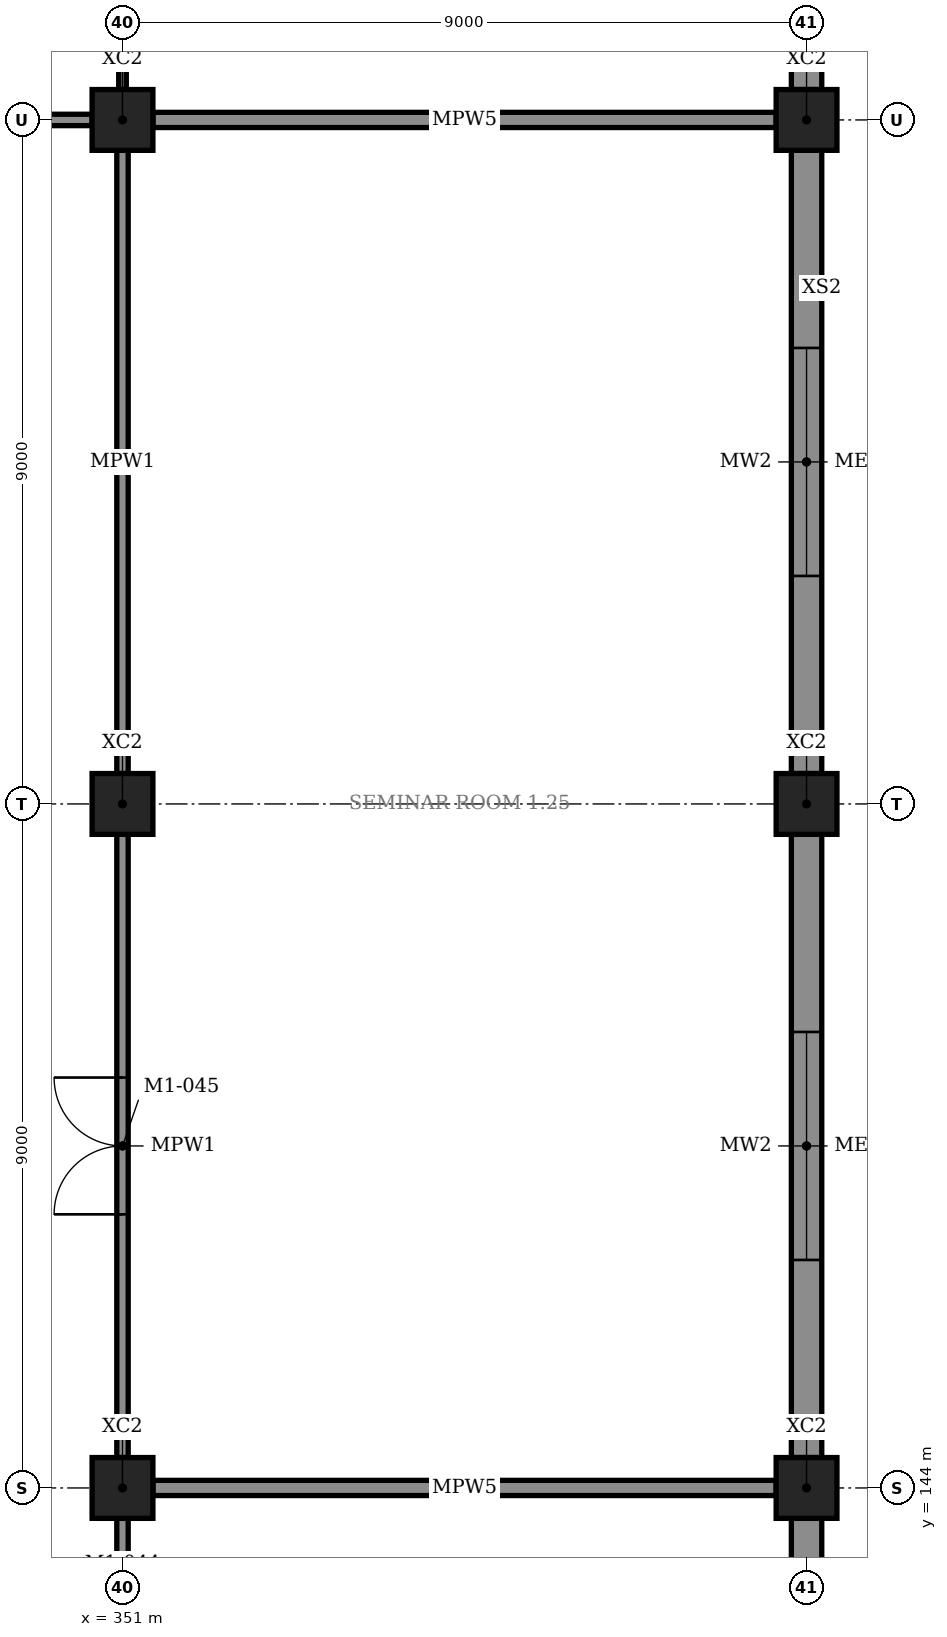
"""IFC4 building model, lengths in metres.
Left out: names, types, materials, properties, quantities, classifications, styles, units other than length and angle.
Written with IfcOpenShell. Run it as: python <this file> out.ifc"""

import sys

from ifc_helpers import new_model, si_unit, direction, frame, frame_2d, origin, origin_2d, place, context, subcontext, project, spatial, rectangle, extrude, element, fill, save


model = new_model("IFC4")
c1 = context("Model", 3, precision=1e-05, world=origin(), true_north=direction((0.0, 1.0)))
c2 = subcontext(c1, "Body", "Model", "MODEL_VIEW")
j1 = project(units=[si_unit("LENGTHUNIT", "METRE"), si_unit("PLANEANGLEUNIT", "RADIAN")], contexts=[c1])
p1 = place(None, origin())
s1 = spatial("IfcSite", under=j1, at=p1, CompositionType="ELEMENT")
p2 = place(p1, origin())
s2 = spatial("IfcBuilding", under=s1, at=p2, CompositionType="ELEMENT")
p3 = place(p2, frame((0.0, 0.0, 6.0)))
s3 = spatial("IfcBuildingStorey", under=s2, at=p3, CompositionType="ELEMENT", Elevation=6.0)
for number, where, z_axis, x_axis in (
    (1, (351.0, 144.0, 0.0), (0.0, 0.0, 1.0), (1.0, 0.0, 0.0)),
    (2, (351.0, 153.0, 0.0), (0.0, 0.0, 1.0), (1.0, 0.0, 0.0)),
    (3, (351.0, 162.0, 0.0), (0.0, 0.0, 1.0), (1.0, 0.0, 0.0)),
    (4, (360.0, 144.0, 0.0), (0.0, 0.0, 1.0), (1.0, 0.0, 0.0)),
    (5, (360.0, 153.0, 0.0), (0.0, 0.0, 1.0), (1.0, 0.0, 0.0)),
    (6, (360.0, 162.0, 0.0), (0.0, 0.0, 1.0), (1.0, 0.0, 0.0)),
):
    element("IfcColumn", number, at=place(p3, frame(where, z_axis=z_axis, x_axis=x_axis)), inside=s3, PredefinedType="COLUMN", context=c2, shape_type="SweptSolid", body=[
        extrude(rectangle(XDim=0.8, YDim=0.8, at=origin_2d()), origin(), (0.0, 0.0, 1.0), 5.5),
    ])
p4 = place(p3, frame((360.0, 135.4, 0.0), z_axis=(0.0, 0.0, 1.0), x_axis=(0.0, 1.0, 0.0)))
e7 = element("IfcWall", 7, at=p4, inside=s3, PredefinedType="STANDARD", context=c2, shape_type="SweptSolid", body=[
    extrude(rectangle(XDim=8.2, YDim=0.4, at=frame_2d((4.1, 0.0))), origin(), (0.0, 0.0, 1.0), 4.32),
])
p5 = place(p4, frame((2.6, 0.0, 0.9)))
e8 = element("IfcOpeningElement", 8, at=p5, cuts=e7, PredefinedType="OPENING", context=c2, shape_type="SweptSolid", body=[
    extrude(rectangle(XDim=3.0, YDim=2.1, at=frame_2d((1.5, 1.05))), frame((0.0, 0.21, 0.0), z_axis=(0.0, -1.0, 0.0), x_axis=(1.0, 0.0, 0.0)), (0.0, 0.0, 1.0), 0.42),
])
p6 = place(p3, frame((360.0, 144.4, 0.0), z_axis=(0.0, 0.0, 1.0), x_axis=(0.0, 1.0, 0.0)))
e9 = element("IfcWall", 9, at=p6, inside=s3, PredefinedType="STANDARD", context=c2, shape_type="SweptSolid", body=[
    extrude(rectangle(XDim=8.2, YDim=0.4, at=frame_2d((4.1, 0.0))), origin(), (0.0, 0.0, 1.0), 4.32),
])
p7 = place(p6, frame((2.6, 0.0, 0.9)))
e10 = element("IfcOpeningElement", 10, at=p7, cuts=e9, PredefinedType="OPENING", context=c2, shape_type="SweptSolid", body=[
    extrude(rectangle(XDim=3.0, YDim=2.1, at=frame_2d((1.5, 1.05))), frame((0.0, 0.21, 0.0), z_axis=(0.0, -1.0, 0.0), x_axis=(1.0, 0.0, 0.0)), (0.0, 0.0, 1.0), 0.42),
])
p8 = place(p3, frame((360.0, 153.4, 0.0), z_axis=(0.0, 0.0, 1.0), x_axis=(0.0, 1.0, 0.0)))
e11 = element("IfcWall", 11, at=p8, inside=s3, PredefinedType="STANDARD", context=c2, shape_type="SweptSolid", body=[
    extrude(rectangle(XDim=8.2, YDim=0.4, at=frame_2d((4.1, 0.0))), origin(), (0.0, 0.0, 1.0), 4.32),
])
p9 = place(p8, frame((2.6, 0.0, 0.9)))
e12 = element("IfcOpeningElement", 12, at=p9, cuts=e11, PredefinedType="OPENING", context=c2, shape_type="SweptSolid", body=[
    extrude(rectangle(XDim=3.0, YDim=2.1, at=frame_2d((1.5, 1.05))), frame((0.0, 0.21, 0.0), z_axis=(0.0, -1.0, 0.0), x_axis=(1.0, 0.0, 0.0)), (0.0, 0.0, 1.0), 0.42),
])
p10 = place(p3, frame((360.0, 162.4, 0.0), z_axis=(0.0, 0.0, 1.0), x_axis=(0.0, 1.0, 0.0)))
e13 = element("IfcWall", 13, at=p10, inside=s3, PredefinedType="STANDARD", context=c2, shape_type="SweptSolid", body=[
    extrude(rectangle(XDim=8.2, YDim=0.4, at=frame_2d((4.1, 0.0))), origin(), (0.0, 0.0, 1.0), 4.32),
])
p11 = place(p10, frame((1.638, 0.0, 0.9)))
e14 = element("IfcOpeningElement", 14, at=p11, cuts=e13, PredefinedType="OPENING", context=c2, shape_type="SweptSolid", body=[
    extrude(rectangle(XDim=3.0, YDim=2.1, at=frame_2d((1.5, 1.05))), frame((0.0, 0.21, 0.0), z_axis=(0.0, -1.0, 0.0), x_axis=(1.0, 0.0, 0.0)), (0.0, 0.0, 1.0), 0.42),
])
p12 = place(p3, frame((342.4, 162.0, 0.0), z_axis=(0.0, 0.0, 1.0), x_axis=(1.0, 0.0, 0.0)))
e15 = element("IfcWall", 15, at=p12, inside=s3, PredefinedType="PARTITIONING", context=c2, shape_type="SweptSolid", body=[
    extrude(rectangle(XDim=8.2, YDim=0.15, at=frame_2d((4.1, 0.0))), origin(), (0.0, 0.0, 1.0), 4.32),
])
p13 = place(p12, frame((3.6, 0.0, 0.0)))
e16 = element("IfcOpeningElement", 16, at=p13, cuts=e15, PredefinedType="OPENING", context=c2, shape_type="SweptSolid", body=[
    extrude(rectangle(XDim=1.0, YDim=2.4, at=frame_2d((0.5, 1.2))), frame((0.0, 0.085, 0.0), z_axis=(0.0, -1.0, 0.0), x_axis=(1.0, 0.0, 0.0)), (0.0, 0.0, 1.0), 0.17),
])
p14 = place(p3, frame((351.0, 162.4, 0.0), z_axis=(0.0, 0.0, 1.0), x_axis=(0.0, 1.0, 0.0)))
e17 = element("IfcWall", 17, at=p14, inside=s3, PredefinedType="PARTITIONING", context=c2, shape_type="SweptSolid", body=[
    extrude(rectangle(XDim=6.275, YDim=0.1, at=frame_2d((3.138, 0.0))), origin(), (0.0, 0.0, 1.0), 4.32),
])
p15 = place(p3, frame((351.4, 144.0, 0.0), z_axis=(0.0, 0.0, 1.0), x_axis=(1.0, 0.0, 0.0)))
e18 = element("IfcWall", 18, at=p15, inside=s3, PredefinedType="PARTITIONING", context=c2, shape_type="SweptSolid", body=[
    extrude(rectangle(XDim=8.2, YDim=0.2, at=frame_2d((4.1, 0.0))), origin(), (0.0, 0.0, 1.0), 4.32),
])
p16 = place(p3, frame((351.0, 135.4, 0.0), z_axis=(0.0, 0.0, 1.0), x_axis=(0.0, 1.0, 0.0)))
e19 = element("IfcWall", 19, at=p16, inside=s3, PredefinedType="PARTITIONING", context=c2, shape_type="SweptSolid", body=[
    extrude(rectangle(XDim=8.2, YDim=0.15, at=frame_2d((4.1, 0.0))), origin(), (0.0, 0.0, 1.0), 4.32),
])
p17 = place(p16, frame((6.3, 0.0, 0.0)))
e20 = element("IfcOpeningElement", 20, at=p17, cuts=e19, PredefinedType="OPENING", context=c2, shape_type="SweptSolid", body=[
    extrude(rectangle(XDim=1.0, YDim=2.4, at=frame_2d((0.5, 1.2))), frame((0.0, 0.085, 0.0), z_axis=(0.0, -1.0, 0.0), x_axis=(1.0, 0.0, 0.0)), (0.0, 0.0, 1.0), 0.17),
])
p18 = place(p3, frame((351.4, 162.0, 0.0), z_axis=(0.0, 0.0, 1.0), x_axis=(1.0, 0.0, 0.0)))
e21 = element("IfcWall", 21, at=p18, inside=s3, PredefinedType="PARTITIONING", context=c2, shape_type="SweptSolid", body=[
    extrude(rectangle(XDim=8.2, YDim=0.2, at=frame_2d((4.1, 0.0))), origin(), (0.0, 0.0, 1.0), 4.32),
])
p19 = place(p3, frame((351.0, 144.4, 0.0), z_axis=(0.0, 0.0, 1.0), x_axis=(0.0, 1.0, 0.0)))
e22 = element("IfcWall", 22, at=p19, inside=s3, PredefinedType="PARTITIONING", context=c2, shape_type="SweptSolid", body=[
    extrude(rectangle(XDim=8.2, YDim=0.15, at=frame_2d((4.1, 0.0))), origin(), (0.0, 0.0, 1.0), 4.32),
])
p20 = place(p19, frame((3.2, 0.0, 0.0)))
e23 = element("IfcOpeningElement", 23, at=p20, cuts=e22, PredefinedType="OPENING", context=c2, shape_type="SweptSolid", body=[
    extrude(rectangle(XDim=1.8, YDim=2.4, at=frame_2d((0.9, 1.2))), frame((0.0, 0.085, 0.0), z_axis=(0.0, -1.0, 0.0), x_axis=(1.0, 0.0, 0.0)), (0.0, 0.0, 1.0), 0.17),
])
p21 = place(p3, frame((351.0, 153.4, 0.0), z_axis=(0.0, 0.0, 1.0), x_axis=(0.0, 1.0, 0.0)))
e24 = element("IfcWall", 24, at=p21, inside=s3, PredefinedType="PARTITIONING", context=c2, shape_type="SweptSolid", body=[
    extrude(rectangle(XDim=8.2, YDim=0.15, at=frame_2d((4.1, 0.0))), origin(), (0.0, 0.0, 1.0), 4.32),
])
p22 = place(p7, origin())
e25 = element("IfcWindow", 25, at=p22, inside=s3, PartitioningType="TRIPLE_PANEL_VERTICAL", PredefinedType="WINDOW", context=c2, shape_type="SweptSolid", body=[
    extrude(rectangle(XDim=3.0, YDim=2.1, at=frame_2d((1.5, 1.05))), frame((0.0, 0.03, 0.0), z_axis=(0.0, -1.0, 0.0), x_axis=(1.0, 0.0, 0.0)), (0.0, 0.0, 1.0), 0.06),
])
fill(e10, e25)
p23 = place(p9, origin())
e26 = element("IfcWindow", 26, at=p23, inside=s3, PartitioningType="TRIPLE_PANEL_VERTICAL", PredefinedType="WINDOW", context=c2, shape_type="SweptSolid", body=[
    extrude(rectangle(XDim=3.0, YDim=2.1, at=frame_2d((1.5, 1.05))), frame((0.0, 0.03, 0.0), z_axis=(0.0, -1.0, 0.0), x_axis=(1.0, 0.0, 0.0)), (0.0, 0.0, 1.0), 0.06),
])
fill(e12, e26)
p24 = place(p20, origin())
e27 = element("IfcDoor", 27, at=p24, inside=s3, OperationType="DOUBLE_DOOR_SINGLE_SWING", PredefinedType="DOOR", context=c2, shape_type="SweptSolid", body=[
    extrude(rectangle(XDim=1.8, YDim=2.4, at=frame_2d((0.9, 1.2))), frame((0.0, 0.025, 0.0), z_axis=(0.0, -1.0, 0.0), x_axis=(1.0, 0.0, 0.0)), (0.0, 0.0, 1.0), 0.05),
])
fill(e23, e27)
save(model, sys.argv[1])
